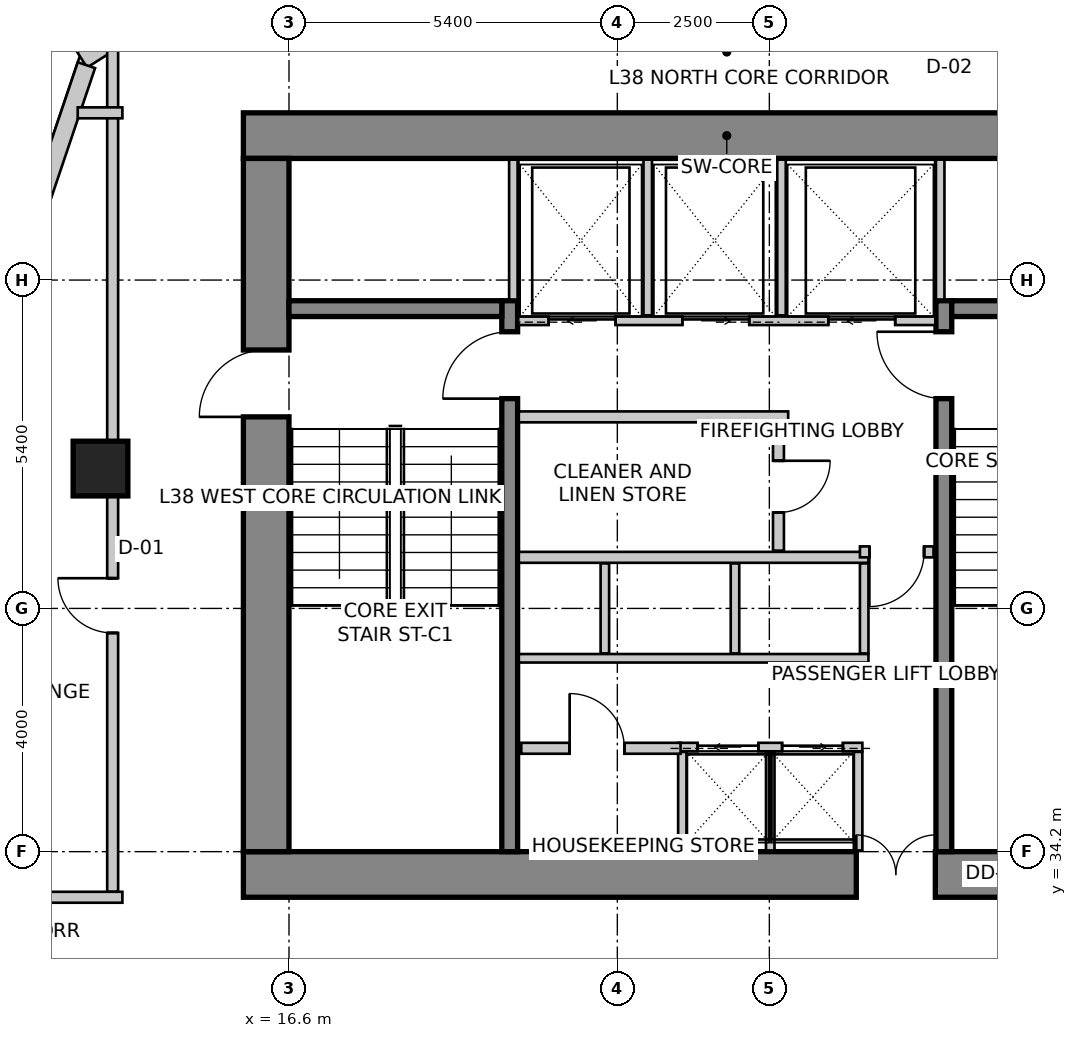
"""IFC4 building model, lengths in metres.
Left out: names, types, materials, properties, quantities, classifications, styles, units other than length and angle.
Written with IfcOpenShell. Run it as: python <this file> out.ifc"""

import sys

from ifc_helpers import new_model, si_unit, direction, frame, frame_2d, origin, origin_2d, place, context, subcontext, project, spatial, rectangle, extrude, source, transform, mapped, element, fill, save


model = new_model("IFC4")
c1 = context("Model", 3, precision=1e-05, world=origin(), true_north=direction((0.0, 1.0)))
c2 = subcontext(c1, "Body", "Model", "MODEL_VIEW")
j1 = project(units=[si_unit("LENGTHUNIT", "METRE"), si_unit("PLANEANGLEUNIT", "RADIAN")], contexts=[c1])
p1 = place(None, origin())
s1 = spatial("IfcSite", under=j1, at=p1, CompositionType="ELEMENT")
p2 = place(p1, origin())
s2 = spatial("IfcBuilding", under=s1, at=p2, CompositionType="ELEMENT")
p3 = place(p2, frame((0.0, 0.0, 153.8)))
s3 = spatial("IfcBuildingStorey", under=s2, at=p3, CompositionType="ELEMENT", Elevation=153.8)
p4 = place(p3, frame((15.85, 45.975, 0.0), z_axis=(0.0, 0.0, 1.0), x_axis=(1.0, 0.0, 0.0)))
e1 = element("IfcWall", 1, at=p4, inside=s3, PredefinedType="SHEAR", context=c2, shape_type="SweptSolid", body=[
    extrude(rectangle(XDim=15.9, YDim=0.75, at=frame_2d((7.95, 0.0))), origin(), (0.0, 0.0, 1.0), 3.6),
])
p5 = place(p3, frame((15.85, 33.825, 0.0), z_axis=(0.0, 0.0, 1.0), x_axis=(1.0, 0.0, 0.0)))
e2 = element("IfcWall", 2, at=p5, inside=s3, PredefinedType="SHEAR", context=c2, shape_type="SweptSolid", body=[
    extrude(rectangle(XDim=15.9, YDim=0.75, at=frame_2d((7.95, 0.0))), origin(), (0.0, 0.0, 1.0), 3.6),
])
m1 = source(origin(), c2, "Body", "SweptSolid", [
    extrude(rectangle(XDim=1.3, YDim=2.15, at=frame_2d((0.65, 1.075))), frame((0.0, 0.385, 0.0), z_axis=(0.0, -1.0, 0.0), x_axis=(1.0, 0.0, 0.0)), (0.0, 0.0, 1.0), 0.77),
])
p6 = place(p5, frame((10.08, 0.0, 0.0)))
e3 = element("IfcOpeningElement", 3, at=p6, cuts=e2, PredefinedType="OPENING", context=c2, shape_type="MappedRepresentation", body=[
    mapped(m1, transform((0.0, 0.0, 0.0), scale=1.0)),
])
p7 = place(p3, frame((16.225, 34.2, 0.0), z_axis=(0.0, 0.0, 1.0), x_axis=(0.0, 1.0, 0.0)))
e4 = element("IfcWall", 4, at=p7, inside=s3, PredefinedType="SHEAR", context=c2, shape_type="SweptSolid", body=[
    extrude(rectangle(XDim=11.4, YDim=0.75, at=frame_2d((5.7, 0.0))), origin(), (0.0, 0.0, 1.0), 3.6),
])
m2 = source(origin(), c2, "Body", "SweptSolid", [
    extrude(rectangle(XDim=1.1, YDim=2.15, at=frame_2d((0.55, 1.075))), frame((0.0, 0.385, 0.0), z_axis=(0.0, -1.0, 0.0), x_axis=(1.0, 0.0, 0.0)), (0.0, 0.0, 1.0), 0.77),
])
p8 = place(p7, frame((7.15, 0.0, 0.0)))
e5 = element("IfcOpeningElement", 5, at=p8, cuts=e4, PredefinedType="OPENING", context=c2, shape_type="MappedRepresentation", body=[
    mapped(m2, transform((0.0, 0.0, 0.0), scale=1.0)),
])
p9 = place(p3, frame((20.23, 34.2, 0.0), z_axis=(0.0, 0.0, 1.0), x_axis=(0.0, 1.0, 0.0)))
e6 = element("IfcWall", 6, at=p9, inside=s3, PredefinedType="SHEAR", context=c2, shape_type="SweptSolid", body=[
    extrude(rectangle(XDim=9.06, YDim=0.26, at=frame_2d((4.53, 0.0))), origin(), (0.0, 0.0, 1.0), 3.6),
])
m3 = source(origin(), c2, "Body", "SweptSolid", [
    extrude(rectangle(XDim=1.1, YDim=2.15, at=frame_2d((0.55, 1.075))), frame((0.0, 0.14, 0.0), z_axis=(0.0, -1.0, 0.0), x_axis=(1.0, 0.0, 0.0)), (0.0, 0.0, 1.0), 0.28),
])
p10 = place(p9, frame((7.45, 0.0, 0.0)))
e7 = element("IfcOpeningElement", 7, at=p10, cuts=e6, PredefinedType="OPENING", context=c2, shape_type="MappedRepresentation", body=[
    mapped(m3, transform((0.0, 0.0, 0.0), scale=1.0)),
])
p11 = place(p3, frame((27.37, 34.2, 0.0), z_axis=(0.0, 0.0, 1.0), x_axis=(0.0, 1.0, 0.0)))
e8 = element("IfcWall", 8, at=p11, inside=s3, PredefinedType="SHEAR", context=c2, shape_type="SweptSolid", body=[
    extrude(rectangle(XDim=9.06, YDim=0.26, at=frame_2d((4.53, 0.0))), origin(), (0.0, 0.0, 1.0), 3.6),
])
p12 = place(p11, frame((7.45, 0.0, 0.0)))
e9 = element("IfcOpeningElement", 9, at=p12, cuts=e8, PredefinedType="OPENING", context=c2, shape_type="MappedRepresentation", body=[
    mapped(m3, transform((0.0, 0.0, 0.0), scale=1.0)),
])
for number, where, z_axis, x_axis in (
    (10, (16.6, 43.13, 0.0), (0.0, 0.0, 1.0), (1.0, 0.0, 0.0)),
    (11, (27.5, 43.13, 0.0), (0.0, 0.0, 1.0), (1.0, 0.0, 0.0)),
):
    element("IfcWall", number, at=place(p3, frame(where, z_axis=z_axis, x_axis=x_axis)), inside=s3, PredefinedType="SHEAR", context=c2, shape_type="SweptSolid", body=[
        extrude(rectangle(XDim=3.5, YDim=0.26, at=frame_2d((1.75, 0.0))), origin(), (0.0, 0.0, 1.0), 3.6),
    ])
m4 = source(origin(), c2, "Body", "SweptSolid", [
    extrude(rectangle(XDim=0.9, YDim=0.9, at=origin_2d()), origin(), (0.0, 0.0, 1.0), 3.6),
])
p13 = place(p3, frame((13.5, 40.5, 0.0), z_axis=(0.0, 0.0, 1.0), x_axis=(1.0, 0.0, 0.0)))
e12 = element("IfcColumn", 12, at=p13, inside=s3, PredefinedType="COLUMN", context=c2, shape_type="MappedRepresentation", body=[
    mapped(m4, transform((0.0, 0.0, 0.0), scale=1.0)),
])
p14 = place(p3, frame((21.875, 52.742, 0.0), z_axis=(0.0, 0.0, 1.0), x_axis=(-0.843662465249, -0.536873956092, 0.0)))
e13 = element("IfcWall", 13, at=p14, inside=s3, PredefinedType="SOLIDWALL", context=c2, shape_type="SweptSolid", body=[
    extrude(rectangle(XDim=10.284, YDim=0.3, at=frame_2d((5.142, 0.0))), origin(), (0.0, 0.0, 1.0), 3.35),
])
m5 = source(origin(), c2, "Body", "SweptSolid", [
    extrude(rectangle(XDim=2.1, YDim=2.0, at=frame_2d((1.05, 1.0))), frame((0.0, 0.16, 0.0), z_axis=(0.0, -1.0, 0.0), x_axis=(1.0, 0.0, 0.0)), (0.0, 0.0, 1.0), 0.32),
])
p15 = place(p14, frame((2.806, 0.0, 0.85)))
e14 = element("IfcOpeningElement", 14, at=p15, cuts=e13, PredefinedType="OPENING", context=c2, shape_type="MappedRepresentation", body=[
    mapped(m5, transform((0.0, 0.0, 0.0), scale=1.0)),
])
m6 = source(origin(), c2, "Body", "SweptSolid", [
    extrude(rectangle(XDim=1.2, YDim=1.6, at=frame_2d((0.6, 0.8))), frame((0.0, 0.16, 0.0), z_axis=(0.0, -1.0, 0.0), x_axis=(1.0, 0.0, 0.0)), (0.0, 0.0, 1.0), 0.32),
])
p16 = place(p14, frame((8.087, 0.0, 0.85)))
e15 = element("IfcOpeningElement", 15, at=p16, cuts=e13, PredefinedType="OPENING", context=c2, shape_type="MappedRepresentation", body=[
    mapped(m6, transform((0.0, 0.0, 0.0), scale=1.0)),
])
p17 = place(p3, frame((13.269, 47.134, 0.0), z_axis=(0.0, 0.0, 1.0), x_axis=(-0.319929773322, -0.947441259468, 0.0)))
e16 = element("IfcWall", 16, at=p17, inside=s3, PredefinedType="SOLIDWALL", context=c2, shape_type="SweptSolid", body=[
    extrude(rectangle(XDim=16.134, YDim=0.3, at=frame_2d((8.067, 0.0))), origin(), (0.0, 0.0, 1.0), 3.35),
])
m7 = source(origin(), c2, "Body", "SweptSolid", [
    extrude(rectangle(XDim=2.4, YDim=2.2, at=frame_2d((1.2, 1.1))), frame((0.0, 0.16, 0.0), z_axis=(0.0, -1.0, 0.0), x_axis=(1.0, 0.0, 0.0)), (0.0, 0.0, 1.0), 0.32),
])
p18 = place(p17, frame((2.276, 0.0, 0.85)))
e17 = element("IfcOpeningElement", 17, at=p18, cuts=e16, PredefinedType="OPENING", context=c2, shape_type="MappedRepresentation", body=[
    mapped(m7, transform((0.0, 0.0, 0.0), scale=1.0)),
])
p19 = place(p17, frame((7.361, 0.0, 0.85)))
e18 = element("IfcOpeningElement", 18, at=p19, cuts=e16, PredefinedType="OPENING", context=c2, shape_type="MappedRepresentation", body=[
    mapped(m5, transform((0.0, 0.0, 0.0), scale=1.0)),
])
p20 = place(p17, frame((12.146, 0.0, 0.85)))
e19 = element("IfcOpeningElement", 19, at=p20, cuts=e16, PredefinedType="OPENING", context=c2, shape_type="MappedRepresentation", body=[
    mapped(m7, transform((0.0, 0.0, 0.0), scale=1.0)),
])
p21 = place(p3, frame((20.37, 42.93, 0.0), z_axis=(0.0, 0.0, 1.0), x_axis=(1.0, 0.0, 0.0)))
e20 = element("IfcWall", 20, at=p21, inside=s3, PredefinedType="SOLIDWALL", context=c2, shape_type="SweptSolid", body=[
    extrude(rectangle(XDim=6.86, YDim=0.14, at=frame_2d((3.43, 0.0))), origin(), (0.0, 0.0, 1.0), 3.35),
])
m8 = source(origin(), c2, "Body", "SweptSolid", [
    extrude(rectangle(XDim=1.1, YDim=2.15, at=frame_2d((0.55, 1.075))), frame((0.0, 0.08, 0.0), z_axis=(0.0, -1.0, 0.0), x_axis=(1.0, 0.0, 0.0)), (0.0, 0.0, 1.0), 0.16),
])
p22 = place(p21, frame((0.5, 0.0, 0.0)))
e21 = element("IfcOpeningElement", 21, at=p22, cuts=e20, PredefinedType="OPENING", context=c2, shape_type="MappedRepresentation", body=[
    mapped(m8, transform((0.0, 0.0, 0.0), scale=1.0)),
])
p23 = place(p21, frame((2.7, 0.0, 0.0)))
e22 = element("IfcOpeningElement", 22, at=p23, cuts=e20, PredefinedType="OPENING", context=c2, shape_type="MappedRepresentation", body=[
    mapped(m8, transform((0.0, 0.0, 0.0), scale=1.0)),
])
p24 = place(p21, frame((5.1, 0.0, 0.0)))
e23 = element("IfcOpeningElement", 23, at=p24, cuts=e20, PredefinedType="OPENING", context=c2, shape_type="MappedRepresentation", body=[
    mapped(m8, transform((0.0, 0.0, 0.0), scale=1.0)),
])
for number, where, z_axis, x_axis in (
    (24, (20.29, 43.28, 0.0), (0.0, 0.0, 1.0), (0.0, 1.0, 0.0)),
    (25, (27.31, 43.28, 0.0), (0.0, 0.0, 1.0), (0.0, 1.0, 0.0)),
):
    element("IfcWall", number, at=place(p3, frame(where, z_axis=z_axis, x_axis=x_axis)), inside=s3, PredefinedType="SOLIDWALL", context=c2, shape_type="SweptSolid", body=[
        extrude(rectangle(XDim=2.3, YDim=0.14, at=frame_2d((1.15, 0.0))), origin(), (0.0, 0.0, 1.0), 3.35),
    ])
for number, where, z_axis, x_axis in (
    (26, (22.5, 43.02, 0.0), (0.0, 0.0, 1.0), (0.0, 1.0, 0.0)),
    (27, (24.7, 43.02, 0.0), (0.0, 0.0, 1.0), (0.0, 1.0, 0.0)),
):
    element("IfcWall", number, at=place(p3, frame(where, z_axis=z_axis, x_axis=x_axis)), inside=s3, PredefinedType="SOLIDWALL", context=c2, shape_type="SweptSolid", body=[
        extrude(rectangle(XDim=2.56, YDim=0.14, at=frame_2d((1.28, 0.0))), origin(), (0.0, 0.0, 1.0), 3.35),
    ])
p25 = place(p3, frame((23.0, 35.92, 0.0), z_axis=(0.0, 0.0, 1.0), x_axis=(1.0, 0.0, 0.0)))
e28 = element("IfcWall", 28, at=p25, inside=s3, PredefinedType="SOLIDWALL", context=c2, shape_type="SweptSolid", body=[
    extrude(rectangle(XDim=3.03, YDim=0.14, at=frame_2d((1.515, 0.0))), origin(), (0.0, 0.0, 1.0), 3.35),
])
m9 = source(origin(), c2, "Body", "SweptSolid", [
    extrude(rectangle(XDim=1.0, YDim=2.15, at=frame_2d((0.5, 1.075))), frame((0.0, 0.08, 0.0), z_axis=(0.0, -1.0, 0.0), x_axis=(1.0, 0.0, 0.0)), (0.0, 0.0, 1.0), 0.16),
])
p26 = place(p25, frame((0.32, 0.0, 0.0)))
e29 = element("IfcOpeningElement", 29, at=p26, cuts=e28, PredefinedType="OPENING", context=c2, shape_type="MappedRepresentation", body=[
    mapped(m9, transform((0.0, 0.0, 0.0), scale=1.0)),
])
p27 = place(p25, frame((1.71, 0.0, 0.0)))
e30 = element("IfcOpeningElement", 30, at=p27, cuts=e28, PredefinedType="OPENING", context=c2, shape_type="MappedRepresentation", body=[
    mapped(m9, transform((0.0, 0.0, 0.0), scale=1.0)),
])
for number, where, z_axis, x_axis in (
    (31, (25.96, 34.22, 0.0), (0.0, 0.0, 1.0), (0.0, 1.0, 0.0)),
    (32, (23.07, 34.22, 0.0), (0.0, 0.0, 1.0), (0.0, 1.0, 0.0)),
    (33, (24.515, 34.22, 0.0), (0.0, 0.0, 1.0), (0.0, 1.0, 0.0)),
):
    element("IfcWall", number, at=place(p3, frame(where, z_axis=z_axis, x_axis=x_axis)), inside=s3, PredefinedType="SOLIDWALL", context=c2, shape_type="SweptSolid", body=[
        extrude(rectangle(XDim=1.62, YDim=0.14, at=frame_2d((0.81, 0.0))), origin(), (0.0, 0.0, 1.0), 2.642),
    ])
p28 = place(p3, frame((20.38, 37.38, 0.0), z_axis=(0.0, 0.0, 1.0), x_axis=(1.0, 0.0, 0.0)))
e34 = element("IfcWall", 34, at=p28, inside=s3, PredefinedType="SOLIDWALL", context=c2, shape_type="SweptSolid", body=[
    extrude(rectangle(XDim=5.75, YDim=0.14, at=frame_2d((2.875, 0.0))), origin(), (0.0, 0.0, 1.0), 3.35),
])
p29 = place(p3, frame((20.38, 39.04, 0.0), z_axis=(0.0, 0.0, 1.0), x_axis=(1.0, 0.0, 0.0)))
e35 = element("IfcWall", 35, at=p29, inside=s3, PredefinedType="SOLIDWALL", context=c2, shape_type="SweptSolid", body=[
    extrude(rectangle(XDim=5.75, YDim=0.18, at=frame_2d((2.875, 0.0))), origin(), (0.0, 0.0, 1.0), 3.35),
])
for number, where, z_axis, x_axis in (
    (36, (26.06, 37.46, 0.0), (0.0, 0.0, 1.0), (0.0, 1.0, 0.0)),
    (37, (21.795, 37.46, 0.0), (0.0, 0.0, 1.0), (0.0, 1.0, 0.0)),
    (38, (23.935, 37.46, 0.0), (0.0, 0.0, 1.0), (0.0, 1.0, 0.0)),
):
    element("IfcWall", number, at=place(p3, frame(where, z_axis=z_axis, x_axis=x_axis)), inside=s3, PredefinedType="SOLIDWALL", context=c2, shape_type="SweptSolid", body=[
        extrude(rectangle(XDim=1.48, YDim=0.14, at=frame_2d((0.74, 0.0))), origin(), (0.0, 0.0, 1.0), 3.35),
    ])
p30 = place(p3, frame((24.81, 41.35, 0.0), z_axis=(0.0, 0.0, 1.0), x_axis=(-1.0, 0.0, 0.0)))
e39 = element("IfcWall", 39, at=p30, inside=s3, PredefinedType="PARTITIONING", context=c2, shape_type="SweptSolid", body=[
    extrude(rectangle(XDim=4.43, YDim=0.18, at=frame_2d((2.215, 0.0))), origin(), (0.0, 0.0, 1.0), 3.35),
])
p31 = place(p3, frame((24.65, 41.256, 0.0), z_axis=(0.0, 0.0, 1.0), x_axis=(0.0, -1.0, 0.0)))
e40 = element("IfcWall", 40, at=p31, inside=s3, PredefinedType="PARTITIONING", context=c2, shape_type="SweptSolid", body=[
    extrude(rectangle(XDim=2.106, YDim=0.18, at=frame_2d((1.053, 0.0))), origin(), (0.0, 0.0, 1.0), 3.35),
])
m10 = source(origin(), c2, "Body", "SweptSolid", [
    extrude(rectangle(XDim=0.85, YDim=2.15, at=frame_2d((0.425, 1.075))), frame((0.0, 0.1, 0.0), z_axis=(0.0, -1.0, 0.0), x_axis=(1.0, 0.0, 0.0)), (0.0, 0.0, 1.0), 0.2),
])
p32 = place(p31, frame((0.628, 0.0, 0.0)))
e41 = element("IfcOpeningElement", 41, at=p32, cuts=e40, PredefinedType="OPENING", context=c2, shape_type="MappedRepresentation", body=[
    mapped(m10, transform((0.0, 0.0, 0.0), scale=1.0)),
])
p33 = place(p3, frame((27.2, 39.13, 0.0), z_axis=(0.0, 0.0, 1.0), x_axis=(-1.0, 0.0, 0.0)))
e42 = element("IfcWall", 42, at=p33, inside=s3, PredefinedType="PARTITIONING", context=c2, shape_type="SweptSolid", body=[
    extrude(rectangle(XDim=1.21, YDim=0.18, at=frame_2d((0.605, 0.0))), origin(), (0.0, 0.0, 1.0), 3.35),
])
m11 = source(origin(), c2, "Body", "SweptSolid", [
    extrude(rectangle(XDim=0.9, YDim=2.15, at=frame_2d((0.45, 1.075))), frame((0.0, 0.1, 0.0), z_axis=(0.0, -1.0, 0.0), x_axis=(1.0, 0.0, 0.0)), (0.0, 0.0, 1.0), 0.2),
])
p34 = place(p33, frame((0.155, 0.0, 0.0)))
e43 = element("IfcOpeningElement", 43, at=p34, cuts=e42, PredefinedType="OPENING", context=c2, shape_type="MappedRepresentation", body=[
    mapped(m11, transform((0.0, 0.0, 0.0), scale=1.0)),
])
p35 = place(p3, frame((20.42, 35.9, 0.0), z_axis=(0.0, 0.0, 1.0), x_axis=(1.0, 0.0, 0.0)))
e44 = element("IfcWall", 44, at=p35, inside=s3, PredefinedType="PARTITIONING", context=c2, shape_type="SweptSolid", body=[
    extrude(rectangle(XDim=2.62, YDim=0.18, at=frame_2d((1.31, 0.0))), origin(), (0.0, 0.0, 1.0), 3.35),
])
p36 = place(p35, frame((0.796, 0.0, 0.0)))
e45 = element("IfcOpeningElement", 45, at=p36, cuts=e44, PredefinedType="OPENING", context=c2, shape_type="MappedRepresentation", body=[
    mapped(m11, transform((0.0, 0.0, 0.0), scale=1.0)),
])
p37 = place(p3, frame((12.594, 33.45, 0.0), z_axis=(0.0, 0.0, 1.0), x_axis=(1.0, 0.0, 0.0)))
e46 = element("IfcWall", 46, at=p37, inside=s3, PredefinedType="PARTITIONING", context=c2, shape_type="SweptSolid", body=[
    extrude(rectangle(XDim=1.266, YDim=0.18, at=frame_2d((0.633, 0.0))), origin(), (0.0, 0.0, 1.0), 3.35),
])
p38 = place(p3, frame((13.7, 33.544, 0.0), z_axis=(0.0, 0.0, 1.0), x_axis=(0.0, 1.0, 0.0)))
e47 = element("IfcWall", 47, at=p38, inside=s3, PredefinedType="PARTITIONING", context=c2, shape_type="SweptSolid", body=[
    extrude(rectangle(XDim=13.86, YDim=0.18, at=frame_2d((6.93, 0.0))), origin(), (0.0, 0.0, 1.0), 2.492),
])
p39 = place(p38, frame((4.253, 0.0, 0.0)))
e48 = element("IfcOpeningElement", 48, at=p39, cuts=e47, PredefinedType="OPENING", context=c2, shape_type="MappedRepresentation", body=[
    mapped(m11, transform((0.0, 0.0, 0.0), scale=1.0)),
])
p40 = place(p3, frame((13.86, 46.35, 0.0), z_axis=(0.0, 0.0, 1.0), x_axis=(-1.0, 0.0, 0.0)))
e49 = element("IfcWall", 49, at=p40, inside=s3, PredefinedType="PARTITIONING", context=c2, shape_type="SweptSolid", body=[
    extrude(rectangle(XDim=0.735, YDim=0.18, at=frame_2d((0.367, 0.0))), origin(), (0.0, 0.0, 1.0), 3.35),
])
m12 = source(origin(), c2, "Body", "SweptSolid", [
    extrude(rectangle(XDim=1.1, YDim=2.15, at=frame_2d((0.55, 1.075))), frame((0.0, 0.025, 0.0), z_axis=(0.0, -1.0, 0.0), x_axis=(1.0, 0.0, 0.0)), (0.0, 0.0, 1.0), 0.05),
])
p41 = place(p22, origin())
e50 = element("IfcDoor", 50, at=p41, inside=s3, OperationType="SLIDING_TO_LEFT", PredefinedType="DOOR", context=c2, shape_type="MappedRepresentation", body=[
    mapped(m12, transform((0.0, 0.0, 0.0), scale=1.0)),
])
fill(e21, e50)
p42 = place(p23, origin())
e51 = element("IfcDoor", 51, at=p42, inside=s3, OperationType="SLIDING_TO_RIGHT", PredefinedType="DOOR", context=c2, shape_type="MappedRepresentation", body=[
    mapped(m12, transform((0.0, 0.0, 0.0), scale=1.0)),
])
fill(e22, e51)
m13 = source(origin(), c2, "Body", "SweptSolid", [
    extrude(rectangle(XDim=1.1, YDim=2.15, at=frame_2d((0.55, 1.075))), frame((0.0, 0.025, 0.0), z_axis=(0.0, -1.0, 0.0), x_axis=(1.0, 0.0, 0.0)), (0.0, 0.0, 1.0), 0.05),
])
p43 = place(p24, origin())
e52 = element("IfcDoor", 52, at=p43, inside=s3, OperationType="SLIDING_TO_LEFT", PredefinedType="DOOR", context=c2, shape_type="MappedRepresentation", body=[
    mapped(m13, transform((0.0, 0.0, 0.0), scale=1.0)),
])
fill(e23, e52)
m14 = source(origin(), c2, "Body", "SweptSolid", [
    extrude(rectangle(XDim=1.0, YDim=2.15, at=frame_2d((0.5, 1.075))), frame((0.0, 0.025, 0.0), z_axis=(0.0, -1.0, 0.0), x_axis=(1.0, 0.0, 0.0)), (0.0, 0.0, 1.0), 0.05),
])
p44 = place(p26, origin())
e53 = element("IfcDoor", 53, at=p44, inside=s3, OperationType="SLIDING_TO_LEFT", PredefinedType="DOOR", context=c2, shape_type="MappedRepresentation", body=[
    mapped(m14, transform((0.0, 0.0, 0.0), scale=1.0)),
])
fill(e29, e53)
p45 = place(p27, origin())
e54 = element("IfcDoor", 54, at=p45, inside=s3, OperationType="SLIDING_TO_RIGHT", PredefinedType="DOOR", context=c2, shape_type="MappedRepresentation", body=[
    mapped(m14, transform((0.0, 0.0, 0.0), scale=1.0)),
])
fill(e30, e54)
m15 = source(origin(), c2, "Body", "SweptSolid", [
    extrude(rectangle(XDim=1.1, YDim=2.15, at=frame_2d((0.55, 1.075))), frame((0.0, 0.025, 0.0), z_axis=(0.0, -1.0, 0.0), x_axis=(1.0, 0.0, 0.0)), (0.0, 0.0, 1.0), 0.05),
])
p46 = place(p10, origin())
e55 = element("IfcDoor", 55, at=p46, inside=s3, OperationType="SINGLE_SWING_LEFT", PredefinedType="DOOR", context=c2, shape_type="MappedRepresentation", body=[
    mapped(m15, transform((0.0, 0.0, 0.0), scale=1.0)),
])
fill(e7, e55)
p47 = place(p12, origin())
e56 = element("IfcDoor", 56, at=p47, inside=s3, OperationType="SINGLE_SWING_RIGHT", PredefinedType="DOOR", context=c2, shape_type="MappedRepresentation", body=[
    mapped(m15, transform((0.0, 0.0, 0.0), scale=1.0)),
])
fill(e9, e56)
p48 = place(p8, origin())
e57 = element("IfcDoor", 57, at=p48, inside=s3, OperationType="SINGLE_SWING_LEFT", PredefinedType="DOOR", context=c2, shape_type="MappedRepresentation", body=[
    mapped(m15, transform((0.0, 0.0, 0.0), scale=1.0)),
])
fill(e5, e57)
m16 = source(origin(), c2, "Body", "SweptSolid", [
    extrude(rectangle(XDim=1.3, YDim=2.15, at=frame_2d((0.65, 1.075))), frame((0.0, 0.025, 0.0), z_axis=(0.0, -1.0, 0.0), x_axis=(1.0, 0.0, 0.0)), (0.0, 0.0, 1.0), 0.05),
])
p49 = place(p6, origin())
e58 = element("IfcDoor", 58, at=p49, inside=s3, OperationType="DOUBLE_DOOR_SINGLE_SWING", PredefinedType="DOOR", context=c2, shape_type="MappedRepresentation", body=[
    mapped(m16, transform((0.0, 0.0, 0.0), scale=1.0)),
])
fill(e3, e58)
m17 = source(origin(), c2, "Body", "SweptSolid", [
    extrude(rectangle(XDim=0.85, YDim=2.15, at=frame_2d((0.425, 1.075))), frame((0.0, 0.025, 0.0), z_axis=(0.0, -1.0, 0.0), x_axis=(1.0, 0.0, 0.0)), (0.0, 0.0, 1.0), 0.05),
])
p50 = place(p32, origin())
e59 = element("IfcDoor", 59, at=p50, inside=s3, OperationType="SINGLE_SWING_LEFT", PredefinedType="DOOR", context=c2, shape_type="MappedRepresentation", body=[
    mapped(m17, transform((0.0, 0.0, 0.0), scale=1.0)),
])
fill(e41, e59)
m18 = source(origin(), c2, "Body", "SweptSolid", [
    extrude(rectangle(XDim=0.9, YDim=2.15, at=frame_2d((0.45, 1.075))), frame((0.0, 0.025, 0.0), z_axis=(0.0, -1.0, 0.0), x_axis=(1.0, 0.0, 0.0)), (0.0, 0.0, 1.0), 0.05),
])
p51 = place(p34, origin())
e60 = element("IfcDoor", 60, at=p51, inside=s3, OperationType="SINGLE_SWING_RIGHT", PredefinedType="DOOR", context=c2, shape_type="MappedRepresentation", body=[
    mapped(m18, transform((0.0, 0.0, 0.0), scale=1.0)),
])
fill(e43, e60)
p52 = place(p36, origin())
e61 = element("IfcDoor", 61, at=p52, inside=s3, OperationType="SINGLE_SWING_LEFT", PredefinedType="DOOR", context=c2, shape_type="MappedRepresentation", body=[
    mapped(m18, transform((0.0, 0.0, 0.0), scale=1.0)),
])
fill(e45, e61)
m19 = source(origin(), c2, "Body", "SweptSolid", [
    extrude(rectangle(XDim=0.9, YDim=2.15, at=frame_2d((0.45, 1.075))), frame((0.0, 0.025, 0.0), z_axis=(0.0, -1.0, 0.0), x_axis=(1.0, 0.0, 0.0)), (0.0, 0.0, 1.0), 0.05),
])
p53 = place(p39, origin())
e62 = element("IfcDoor", 62, at=p53, inside=s3, OperationType="SINGLE_SWING_RIGHT", PredefinedType="DOOR", context=c2, shape_type="MappedRepresentation", body=[
    mapped(m19, transform((0.0, 0.0, 0.0), scale=1.0)),
])
fill(e48, e62)
save(model, sys.argv[1])
